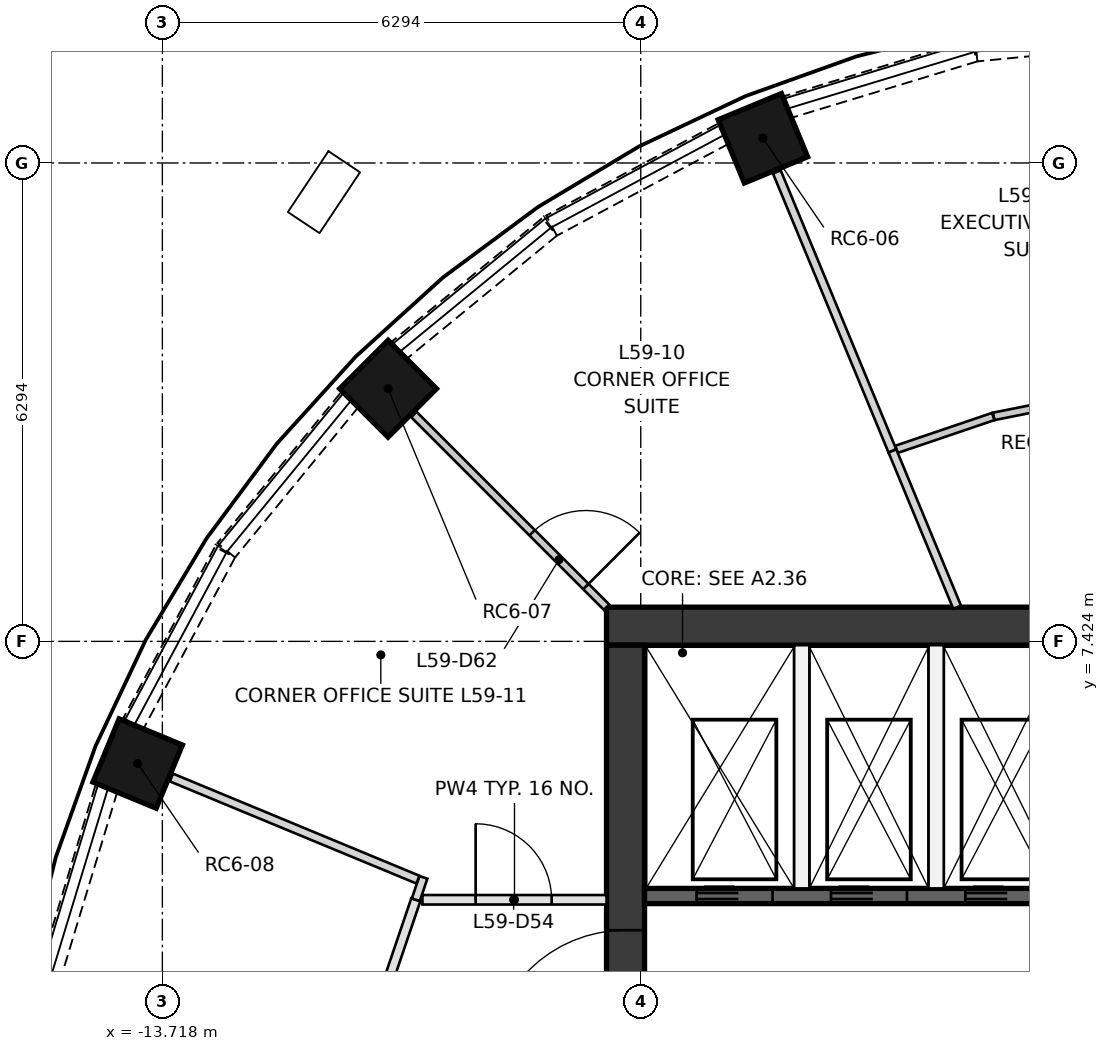
"""IFC4 building model, lengths in metres.
Left out: names, types, materials, properties, quantities, classifications, styles, units other than length and angle.
Written with IfcOpenShell. Run it as: python <this file> out.ifc"""

import sys

from ifc_helpers import new_model, si_unit, direction, frame, frame_2d, origin, origin_2d, place, context, subcontext, project, spatial, rectangle, extrude, element, fill, save


model = new_model("IFC4")
c1 = context("Model", 3, precision=1e-05, world=origin(), true_north=direction((0.0, 1.0)))
c2 = subcontext(c1, "Body", "Model", "MODEL_VIEW")
j1 = project(units=[si_unit("LENGTHUNIT", "METRE"), si_unit("PLANEANGLEUNIT", "RADIAN")], contexts=[c1])
p1 = place(None, origin())
s1 = spatial("IfcSite", under=j1, at=p1, CompositionType="ELEMENT")
p2 = place(p1, origin())
s2 = spatial("IfcBuilding", under=s1, at=p2, CompositionType="ELEMENT")
p3 = place(p2, frame((0.0, 0.0, 217.8)))
s3 = spatial("IfcBuildingStorey", under=s2, at=p3, CompositionType="ELEMENT", Elevation=217.8)
for number, where, z_axis, x_axis in (
    (1, (-5.817, 14.043, 0.5), (0.0, 0.0, 1.0), (-0.383, 0.924, 0.0)),
    (2, (-10.748, 10.748, 0.5), (0.0, 0.0, 1.0), (-0.707, 0.707, 0.0)),
    (3, (-14.043, 5.817, 0.5), (0.0, 0.0, 1.0), (-0.924, 0.383, 0.0)),
):
    element("IfcColumn", number, at=place(p3, frame(where, z_axis=z_axis, x_axis=x_axis)), inside=s3, PredefinedType="COLUMN", context=c2, shape_type="SweptSolid", body=[
        extrude(rectangle(XDim=0.9, YDim=0.9, at=origin_2d()), origin(), (0.0, 0.0, 1.0), 2.85),
    ])
p4 = place(p3, frame((-7.874, 7.624, 0.0), z_axis=(0.0, 0.0, 1.0), x_axis=(1.0, 0.0, 0.0)))
e4 = element("IfcWall", 4, at=p4, inside=s3, PredefinedType="SHEAR", context=c2, shape_type="SweptSolid", body=[
    extrude(rectangle(XDim=15.748, YDim=0.5, at=frame_2d((7.874, 0.0))), origin(), (0.0, 0.0, 1.0), 3.35),
])
p5 = place(p3, frame((-7.624, -7.374, 0.0), z_axis=(0.0, 0.0, 1.0), x_axis=(0.0, 1.0, 0.0)))
e5 = element("IfcWall", 5, at=p5, inside=s3, PredefinedType="SHEAR", context=c2, shape_type="SweptSolid", body=[
    extrude(rectangle(XDim=14.748, YDim=0.5, at=frame_2d((7.374, 0.0))), origin(), (0.0, 0.0, 1.0), 3.35),
])
p6 = place(p5, frame((6.874, 0.0, 0.0)))
e6 = element("IfcOpeningElement", 6, at=p6, cuts=e5, PredefinedType="OPENING", context=c2, shape_type="SweptSolid", body=[
    extrude(rectangle(XDim=1.0, YDim=2.1, at=frame_2d((0.5, 1.05))), frame((0.0, 0.26, 0.0), z_axis=(0.0, -1.0, 0.0), x_axis=(1.0, 0.0, 0.0)), (0.0, 0.0, 1.0), 0.52),
])
p7 = place(p5, frame((3.75, 0.0, 0.0)))
e7 = element("IfcOpeningElement", 7, at=p7, cuts=e5, PredefinedType="OPENING", context=c2, shape_type="SweptSolid", body=[
    extrude(rectangle(XDim=1.8, YDim=2.1, at=frame_2d((0.9, 1.05))), frame((0.0, 0.26, 0.0), z_axis=(0.0, -1.0, 0.0), x_axis=(1.0, 0.0, 0.0)), (0.0, 0.0, 1.0), 0.52),
])
p8 = place(p5, frame((9.198, 0.0, 0.0)))
e8 = element("IfcOpeningElement", 8, at=p8, cuts=e5, PredefinedType="OPENING", context=c2, shape_type="SweptSolid", body=[
    extrude(rectangle(XDim=1.8, YDim=2.1, at=frame_2d((0.9, 1.05))), frame((0.0, 0.26, 0.0), z_axis=(0.0, -1.0, 0.0), x_axis=(1.0, 0.0, 0.0)), (0.0, 0.0, 1.0), 0.52),
])
p9 = place(p3, frame((-7.374, 4.074, 0.0), z_axis=(0.0, 0.0, 1.0), x_axis=(1.0, 0.0, 0.0)))
e9 = element("IfcWall", 9, at=p9, inside=s3, PredefinedType="SHEAR", context=c2, shape_type="SweptSolid", body=[
    extrude(rectangle(XDim=7.374, YDim=0.2, at=frame_2d((3.687, 0.0))), origin(), (0.0, 0.0, 1.0), 3.0),
])
p10 = place(p9, frame((0.684, 0.0, 0.0)))
e10 = element("IfcOpeningElement", 10, at=p10, cuts=e9, PredefinedType="OPENING", context=c2, shape_type="SweptSolid", body=[
    extrude(rectangle(XDim=1.0, YDim=2.1, at=frame_2d((0.5, 1.05))), frame((0.0, 0.11, 0.0), z_axis=(0.0, -1.0, 0.0), x_axis=(1.0, 0.0, 0.0)), (0.0, 0.0, 1.0), 0.22),
])
p11 = place(p9, frame((2.453, 0.0, 0.0)))
e11 = element("IfcOpeningElement", 11, at=p11, cuts=e9, PredefinedType="OPENING", context=c2, shape_type="SweptSolid", body=[
    extrude(rectangle(XDim=1.0, YDim=2.1, at=frame_2d((0.5, 1.05))), frame((0.0, 0.11, 0.0), z_axis=(0.0, -1.0, 0.0), x_axis=(1.0, 0.0, 0.0)), (0.0, 0.0, 1.0), 0.22),
])
p12 = place(p9, frame((4.221, 0.0, 0.0)))
e12 = element("IfcOpeningElement", 12, at=p12, cuts=e9, PredefinedType="OPENING", context=c2, shape_type="SweptSolid", body=[
    extrude(rectangle(XDim=1.0, YDim=2.1, at=frame_2d((0.5, 1.05))), frame((0.0, 0.11, 0.0), z_axis=(0.0, -1.0, 0.0), x_axis=(1.0, 0.0, 0.0)), (0.0, 0.0, 1.0), 0.22),
])
p13 = place(p9, frame((5.99, 0.0, 0.0)))
e13 = element("IfcOpeningElement", 13, at=p13, cuts=e9, PredefinedType="OPENING", context=c2, shape_type="SweptSolid", body=[
    extrude(rectangle(XDim=1.0, YDim=2.1, at=frame_2d((0.5, 1.05))), frame((0.0, 0.11, 0.0), z_axis=(0.0, -1.0, 0.0), x_axis=(1.0, 0.0, 0.0)), (0.0, 0.0, 1.0), 0.22),
])
for number, where, z_axis, x_axis in (
    (14, (-5.305, 4.174, 0.0), (0.0, 0.0, 1.0), (0.0, 1.0, 0.0)),
    (15, (-3.537, 4.174, 0.0), (0.0, 0.0, 1.0), (0.0, 1.0, 0.0)),
):
    element("IfcWall", number, at=place(p3, frame(where, z_axis=z_axis, x_axis=x_axis)), inside=s3, PredefinedType="PARTITIONING", context=c2, shape_type="SweptSolid", body=[
        extrude(rectangle(XDim=3.2, YDim=0.2, at=frame_2d((1.6, 0.0))), origin(), (0.0, 0.0, 1.0), 3.0),
    ])
p14 = place(p3, frame((-0.464, 15.455, 0.0), z_axis=(0.0, 0.0, 1.0), x_axis=(-0.995173293352, -0.09813315545, 0.0)))
e16 = element("IfcWall", 16, at=p14, inside=s3, PredefinedType="SOLIDWALL", context=c2, shape_type="SweptSolid", body=[
    extrude(rectangle(XDim=2.558, YDim=0.3, at=frame_2d((1.279, 0.0))), origin(), (0.0, 0.0, 1.0), 0.9),
])
p15 = place(p3, frame((-3.038, 15.198, 0.0), z_axis=(0.0, 0.0, 1.0), x_axis=(-0.956960147557, -0.290219358397, 0.0)))
e17 = element("IfcWall", 17, at=p15, inside=s3, PredefinedType="SOLIDWALL", context=c2, shape_type="SweptSolid", body=[
    extrude(rectangle(XDim=2.557, YDim=0.3, at=frame_2d((1.279, 0.0))), origin(), (0.0, 0.0, 1.0), 0.9),
])
p16 = place(p3, frame((-6.343, 14.1, 0.0), z_axis=(0.0, 0.0, 1.0), x_axis=(-0.881810499649, -0.471603904468, 0.0)))
e18 = element("IfcWall", 18, at=p16, inside=s3, PredefinedType="SOLIDWALL", context=c2, shape_type="SweptSolid", body=[
    extrude(rectangle(XDim=2.557, YDim=0.3, at=frame_2d((1.278, 0.0))), origin(), (0.0, 0.0, 1.0), 0.9),
])
for number, where, z_axis, x_axis in (
    (19, (-8.623, 12.877, 0.0), (0.0, 0.0, 1.0), (-0.773, -0.634, 0.0)),
    (20, (-11.256, 10.6, 0.0), (0.0, 0.0, 1.0), (-0.634, -0.773, 0.0)),
):
    element("IfcWall", number, at=place(p3, frame(where, z_axis=z_axis, x_axis=x_axis)), inside=s3, PredefinedType="SOLIDWALL", context=c2, shape_type="SweptSolid", body=[
        extrude(rectangle(XDim=2.558, YDim=0.3, at=frame_2d((1.279, 0.0))), origin(), (0.0, 0.0, 1.0), 0.9),
    ])
p17 = place(p3, frame((-12.894, 8.598, 0.0), z_axis=(0.0, 0.0, 1.0), x_axis=(-0.471603904468, -0.881810499649, 0.0)))
e21 = element("IfcWall", 21, at=p17, inside=s3, PredefinedType="SOLIDWALL", context=c2, shape_type="SweptSolid", body=[
    extrude(rectangle(XDim=2.557, YDim=0.3, at=frame_2d((1.278, 0.0))), origin(), (0.0, 0.0, 1.0), 0.9),
])
p18 = place(p3, frame((-14.455, 5.486, 0.0), z_axis=(0.0, 0.0, 1.0), x_axis=(-0.290219358397, -0.956960147557, 0.0)))
e22 = element("IfcWall", 22, at=p18, inside=s3, PredefinedType="SOLIDWALL", context=c2, shape_type="SweptSolid", body=[
    extrude(rectangle(XDim=2.557, YDim=0.3, at=frame_2d((1.279, 0.0))), origin(), (0.0, 0.0, 1.0), 0.9),
])
p19 = place(p3, frame((-10.296, 4.024, 0.0), z_axis=(0.0, 0.0, 1.0), x_axis=(1.0, 0.0, 0.0)))
e23 = element("IfcWall", 23, at=p19, inside=s3, PredefinedType="PARTITIONING", context=c2, shape_type="SweptSolid", body=[
    extrude(rectangle(XDim=2.422, YDim=0.125, at=frame_2d((1.211, 0.0))), origin(), (0.0, 0.0, 1.0), 3.0),
])
p20 = place(p19, frame((0.7, 0.0, 0.0)))
e24 = element("IfcOpeningElement", 24, at=p20, cuts=e23, PredefinedType="OPENING", context=c2, shape_type="SweptSolid", body=[
    extrude(rectangle(XDim=1.0, YDim=2.1, at=frame_2d((0.5, 1.05))), frame((0.0, 0.073, 0.0), z_axis=(0.0, -1.0, 0.0), x_axis=(1.0, 0.0, 0.0)), (0.0, 0.0, 1.0), 0.145),
])
p21 = place(p3, frame((-10.769, 2.89, 0.0), z_axis=(0.0, 0.0, 1.0), x_axis=(0.321479033524, 0.946916696972, 0.0)))
e25 = element("IfcWall", 25, at=p21, inside=s3, PredefinedType="PARTITIONING", context=c2, shape_type="SweptSolid", body=[
    extrude(rectangle(XDim=1.198, YDim=0.125, at=frame_2d((0.599, 0.0))), origin(), (0.0, 0.0, 1.0), 3.0),
])
p22 = place(p3, frame((-4.059, 9.95, 0.0), z_axis=(0.0, 0.0, 1.0), x_axis=(0.946944164887, 0.321398115407, 0.0)))
e26 = element("IfcWall", 26, at=p22, inside=s3, PredefinedType="PARTITIONING", context=c2, shape_type="SweptSolid", body=[
    extrude(rectangle(XDim=1.344, YDim=0.1, at=frame_2d((0.672, 0.0))), origin(), (0.0, 0.0, 1.0), 3.0),
])
p23 = place(p3, frame((-2.779, 10.384, 0.0), z_axis=(0.0, 0.0, 1.0), x_axis=(0.980761417594, 0.19521025014, 0.0)))
e27 = element("IfcWall", 27, at=p23, inside=s3, PredefinedType="PARTITIONING", context=c2, shape_type="SweptSolid", body=[
    extrude(rectangle(XDim=1.399, YDim=0.1, at=frame_2d((0.7, 0.0))), origin(), (0.0, 0.0, 1.0), 3.0),
])
p24 = place(p3, frame((-3.261, 7.874, 0.0), z_axis=(0.0, 0.0, 1.0), x_axis=(-0.382684189911, 0.923879218725, 0.0)))
e28 = element("IfcWall", 28, at=p24, inside=s3, PredefinedType="PARTITIONING", context=c2, shape_type="SweptSolid", body=[
    extrude(rectangle(XDim=2.227, YDim=0.11, at=frame_2d((1.114, 0.0))), origin(), (0.0, 0.0, 1.0), 3.0),
])
p25 = place(p3, frame((-4.114, 9.932, 0.0), z_axis=(0.0, 0.0, 1.0), x_axis=(-0.382675844596, 0.923882675432, 0.0)))
e29 = element("IfcWall", 29, at=p25, inside=s3, PredefinedType="PARTITIONING", context=c2, shape_type="SweptSolid", body=[
    extrude(rectangle(XDim=3.97, YDim=0.11, at=frame_2d((1.985, 0.0))), origin(), (0.0, 0.0, 1.0), 3.0),
])
p26 = place(p3, frame((-10.409, 10.409, 0.0), z_axis=(0.0, 0.0, 1.0), x_axis=(0.707106781187, -0.707106781187, 0.0)))
e30 = element("IfcWall", 30, at=p26, inside=s3, PredefinedType="PARTITIONING", context=c2, shape_type="SweptSolid", body=[
    extrude(rectangle(XDim=3.584, YDim=0.1, at=frame_2d((1.792, 0.0))), origin(), (0.0, 0.0, 1.0), 3.0),
])
p27 = place(p26, frame((2.2, 0.0, 0.0)))
e31 = element("IfcOpeningElement", 31, at=p27, cuts=e30, PredefinedType="OPENING", context=c2, shape_type="SweptSolid", body=[
    extrude(rectangle(XDim=1.0, YDim=2.1, at=frame_2d((0.5, 1.05))), frame((0.0, 0.06, 0.0), z_axis=(0.0, -1.0, 0.0), x_axis=(1.0, 0.0, 0.0)), (0.0, 0.0, 1.0), 0.12),
])
p28 = place(p3, frame((-10.384, 4.024, 0.0), z_axis=(0.0, 0.0, 1.0), x_axis=(0.320931919594, 0.947102266382, 0.0)))
e32 = element("IfcWall", 32, at=p28, inside=s3, PredefinedType="PARTITIONING", context=c2, shape_type="SweptSolid", body=[
    extrude(rectangle(XDim=0.311, YDim=0.11, at=frame_2d((0.156, 0.0))), origin(), (0.0, 0.0, 1.0), 3.0),
])
p29 = place(p3, frame((-10.356, 4.289, 0.0), z_axis=(0.0, 0.0, 1.0), x_axis=(-0.923871065891, 0.382703871955, 0.0)))
e33 = element("IfcWall", 33, at=p29, inside=s3, PredefinedType="PARTITIONING", context=c2, shape_type="SweptSolid", body=[
    extrude(rectangle(XDim=3.511, YDim=0.11, at=frame_2d((1.756, 0.0))), origin(), (0.0, 0.0, 1.0), 3.0),
])
p30 = place(p10, frame((1.0, 0.0, 0.0), z_axis=(0.0, 0.0, 1.0), x_axis=(-1.0, 0.0, 0.0)))
e34 = element("IfcDoor", 34, at=p30, inside=s3, OperationType="DOUBLE_DOOR_SLIDING", PredefinedType="DOOR", context=c2, shape_type="SweptSolid", body=[
    extrude(rectangle(XDim=1.0, YDim=2.1, at=frame_2d((0.5, 1.05))), frame((0.0, 0.025, 0.0), z_axis=(0.0, -1.0, 0.0), x_axis=(1.0, 0.0, 0.0)), (0.0, 0.0, 1.0), 0.05),
])
fill(e10, e34)
p31 = place(p11, frame((1.0, 0.0, 0.0), z_axis=(0.0, 0.0, 1.0), x_axis=(-1.0, 0.0, 0.0)))
e35 = element("IfcDoor", 35, at=p31, inside=s3, OperationType="DOUBLE_DOOR_SLIDING", PredefinedType="DOOR", context=c2, shape_type="SweptSolid", body=[
    extrude(rectangle(XDim=1.0, YDim=2.1, at=frame_2d((0.5, 1.05))), frame((0.0, 0.025, 0.0), z_axis=(0.0, -1.0, 0.0), x_axis=(1.0, 0.0, 0.0)), (0.0, 0.0, 1.0), 0.05),
])
fill(e11, e35)
p32 = place(p12, frame((1.0, 0.0, 0.0), z_axis=(0.0, 0.0, 1.0), x_axis=(-1.0, 0.0, 0.0)))
e36 = element("IfcDoor", 36, at=p32, inside=s3, OperationType="DOUBLE_DOOR_SLIDING", PredefinedType="DOOR", context=c2, shape_type="SweptSolid", body=[
    extrude(rectangle(XDim=1.0, YDim=2.1, at=frame_2d((0.5, 1.05))), frame((0.0, 0.025, 0.0), z_axis=(0.0, -1.0, 0.0), x_axis=(1.0, 0.0, 0.0)), (0.0, 0.0, 1.0), 0.05),
])
fill(e12, e36)
p33 = place(p8, origin())
e37 = element("IfcDoor", 37, at=p33, inside=s3, OperationType="DOUBLE_DOOR_SINGLE_SWING", PredefinedType="DOOR", context=c2, shape_type="SweptSolid", body=[
    extrude(rectangle(XDim=1.8, YDim=2.1, at=frame_2d((0.9, 1.05))), frame((0.0, 0.025, 0.0), z_axis=(0.0, -1.0, 0.0), x_axis=(1.0, 0.0, 0.0)), (0.0, 0.0, 1.0), 0.05),
])
fill(e8, e37)
p34 = place(p20, origin())
e38 = element("IfcDoor", 38, at=p34, inside=s3, OperationType="SINGLE_SWING_LEFT", PredefinedType="DOOR", context=c2, shape_type="SweptSolid", body=[
    extrude(rectangle(XDim=1.0, YDim=2.1, at=frame_2d((0.5, 1.05))), frame((0.0, 0.025, 0.0), z_axis=(0.0, -1.0, 0.0), x_axis=(1.0, 0.0, 0.0)), (0.0, 0.0, 1.0), 0.05),
])
fill(e24, e38)
p35 = place(p27, origin())
e39 = element("IfcDoor", 39, at=p35, inside=s3, OperationType="SINGLE_SWING_RIGHT", PredefinedType="DOOR", context=c2, shape_type="SweptSolid", body=[
    extrude(rectangle(XDim=1.0, YDim=2.1, at=frame_2d((0.5, 1.05))), frame((0.0, 0.025, 0.0), z_axis=(0.0, -1.0, 0.0), x_axis=(1.0, 0.0, 0.0)), (0.0, 0.0, 1.0), 0.05),
])
fill(e31, e39)
save(model, sys.argv[1])
